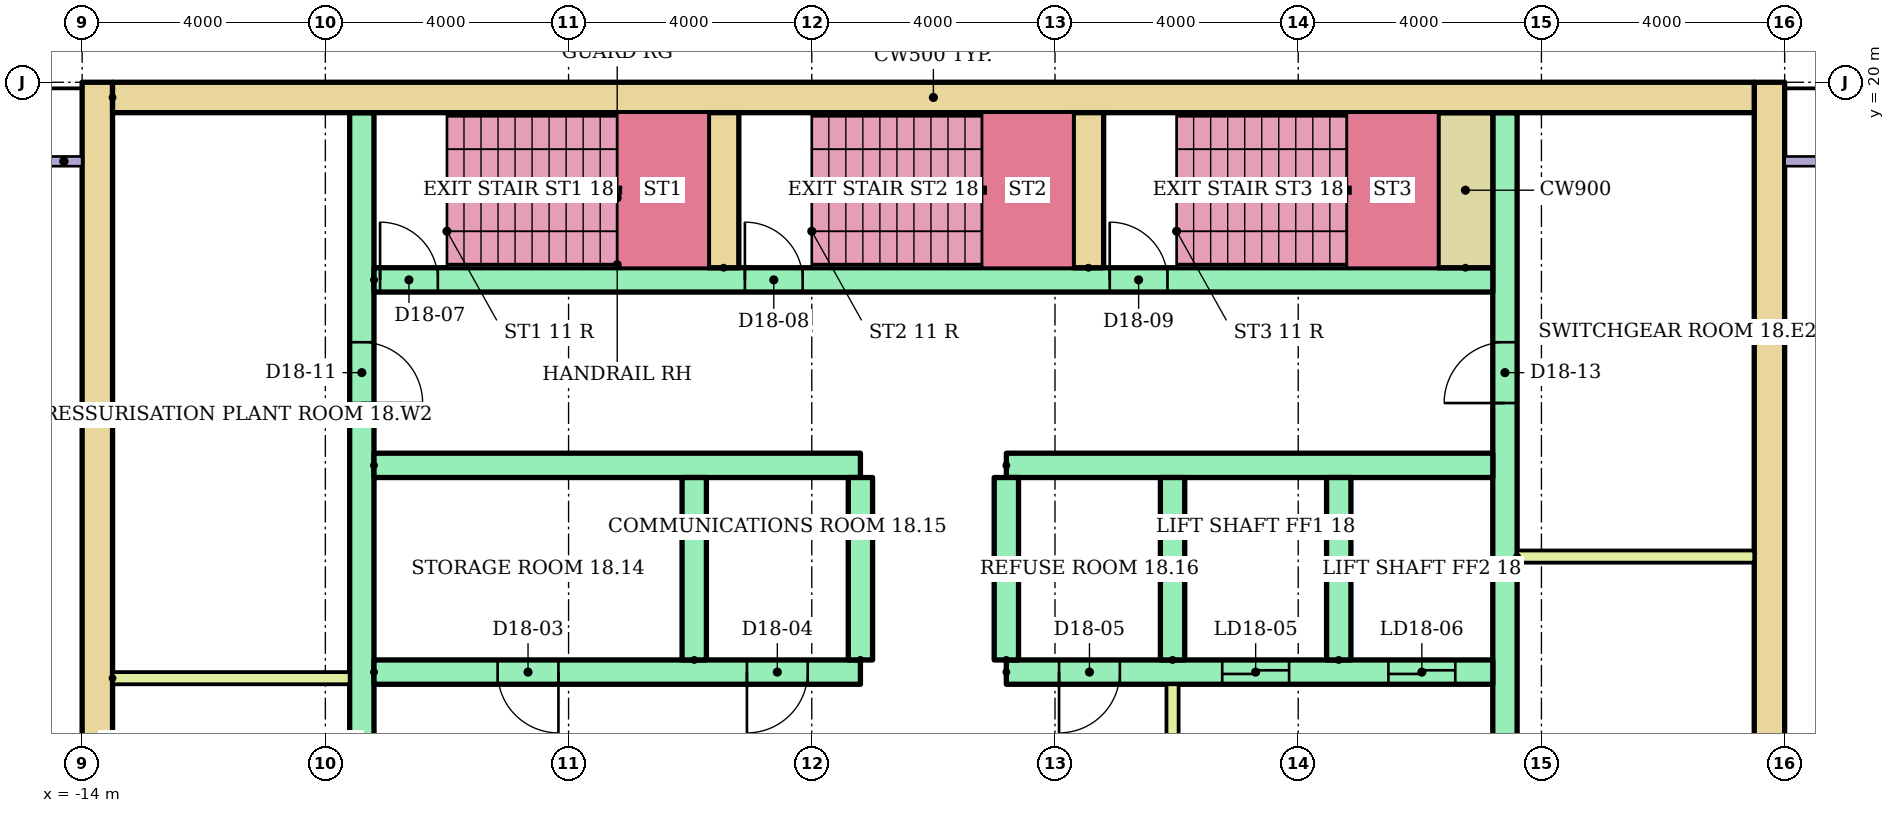
"""IFC4 building model, lengths in metres.
Left out: names, types, materials, properties, quantities, classifications, styles, units other than length and angle.
Written with IfcOpenShell. Run it as: python <this file> out.ifc"""

import sys

from ifc_helpers import new_model, si_unit, direction, frame, frame_2d, origin, place, context, subcontext, project, spatial, rectangle, extrude, element, fill, save


model = new_model("IFC4")
c1 = context("Model", 3, precision=1e-05, world=origin(), true_north=direction((0.0, 1.0)))
c2 = subcontext(c1, "Body", "Model", "MODEL_VIEW")
j1 = project(units=[si_unit("LENGTHUNIT", "METRE"), si_unit("PLANEANGLEUNIT", "RADIAN")], contexts=[c1])
p1 = place(None, origin())
s1 = spatial("IfcSite", under=j1, at=p1, CompositionType="ELEMENT")
p2 = place(p1, origin())
s2 = spatial("IfcBuilding", under=s1, at=p2, CompositionType="ELEMENT")
p3 = place(p2, frame((0.0, 0.0, 73.6)))
s3 = spatial("IfcBuildingStorey", under=s2, at=p3, CompositionType="ELEMENT", Elevation=73.6)
for number, where, z_axis, x_axis in (
    (1, (-13.75, 3.0, 0.0), (0.0, 0.0, 1.0), (0.0, 1.0, 0.0)),
    (2, (13.75, 3.0, 0.0), (0.0, 0.0, 1.0), (0.0, 1.0, 0.0)),
):
    element("IfcWall", number, at=place(p3, frame(where, z_axis=z_axis, x_axis=x_axis)), inside=s3, PredefinedType="SHEAR", context=c2, shape_type="SweptSolid", body=[
        extrude(rectangle(XDim=17.0, YDim=0.5, at=frame_2d((8.5, 0.0))), origin(), (0.0, 0.0, 1.0), 3.62),
    ])
p4 = place(p3, frame((-13.5, 19.75, 0.0)))
e3 = element("IfcWall", 3, at=p4, inside=s3, PredefinedType="SHEAR", context=c2, shape_type="SweptSolid", body=[
    extrude(rectangle(XDim=27.0, YDim=0.5, at=frame_2d((13.5, 0.0))), origin(), (0.0, 0.0, 1.0), 3.62),
])
p5 = place(p3, frame((-9.4, 6.8, 0.0), z_axis=(0.0, 0.0, 1.0), x_axis=(0.0, 1.0, 0.0)))
e4 = element("IfcWall", 4, at=p5, inside=s3, PredefinedType="SHEAR", context=c2, shape_type="SweptSolid", body=[
    extrude(rectangle(XDim=12.7, YDim=0.4, at=frame_2d((6.35, 0.0))), origin(), (0.0, 0.0, 1.0), 3.62),
])
p6 = place(p5, frame((1.15, 0.0, 0.0)))
e5 = element("IfcOpeningElement", 5, at=p6, cuts=e4, PredefinedType="OPENING", context=c2, shape_type="SweptSolid", body=[
    extrude(rectangle(XDim=1.0, YDim=2.1, at=frame_2d((0.5, 1.05))), frame((0.0, 0.21, 0.0), z_axis=(0.0, -1.0, 0.0), x_axis=(1.0, 0.0, 0.0)), (0.0, 0.0, 1.0), 0.42),
])
p7 = place(p5, frame((7.925, 0.0, 0.0)))
e6 = element("IfcOpeningElement", 6, at=p7, cuts=e4, PredefinedType="OPENING", context=c2, shape_type="SweptSolid", body=[
    extrude(rectangle(XDim=1.0, YDim=2.1, at=frame_2d((0.5, 1.05))), frame((0.0, 0.21, 0.0), z_axis=(0.0, -1.0, 0.0), x_axis=(1.0, 0.0, 0.0)), (0.0, 0.0, 1.0), 0.42),
])
p8 = place(p3, frame((9.4, 6.8, 0.0), z_axis=(0.0, 0.0, 1.0), x_axis=(0.0, 1.0, 0.0)))
e7 = element("IfcWall", 7, at=p8, inside=s3, PredefinedType="SHEAR", context=c2, shape_type="SweptSolid", body=[
    extrude(rectangle(XDim=12.7, YDim=0.4, at=frame_2d((6.35, 0.0))), origin(), (0.0, 0.0, 1.0), 3.62),
])
p9 = place(p8, frame((1.15, 0.0, 0.0)))
e8 = element("IfcOpeningElement", 8, at=p9, cuts=e7, PredefinedType="OPENING", context=c2, shape_type="SweptSolid", body=[
    extrude(rectangle(XDim=1.0, YDim=2.1, at=frame_2d((0.5, 1.05))), frame((0.0, 0.21, 0.0), z_axis=(0.0, -1.0, 0.0), x_axis=(1.0, 0.0, 0.0)), (0.0, 0.0, 1.0), 0.42),
])
p10 = place(p8, frame((7.925, 0.0, 0.0)))
e9 = element("IfcOpeningElement", 9, at=p10, cuts=e7, PredefinedType="OPENING", context=c2, shape_type="SweptSolid", body=[
    extrude(rectangle(XDim=1.0, YDim=2.1, at=frame_2d((0.5, 1.05))), frame((0.0, 0.21, 0.0), z_axis=(0.0, -1.0, 0.0), x_axis=(1.0, 0.0, 0.0)), (0.0, 0.0, 1.0), 0.42),
])
p11 = place(p3, frame((-9.2, 10.3, 0.0)))
e10 = element("IfcWall", 10, at=p11, inside=s3, PredefinedType="SHEAR", context=c2, shape_type="SweptSolid", body=[
    extrude(rectangle(XDim=8.0, YDim=0.4, at=frame_2d((4.0, 0.0))), origin(), (0.0, 0.0, 1.0), 3.62),
])
p12 = place(p11, frame((2.033, 0.0, 0.0)))
e11 = element("IfcOpeningElement", 11, at=p12, cuts=e10, PredefinedType="OPENING", context=c2, shape_type="SweptSolid", body=[
    extrude(rectangle(XDim=1.0, YDim=2.1, at=frame_2d((0.5, 1.05))), frame((0.0, 0.21, 0.0), z_axis=(0.0, -1.0, 0.0), x_axis=(1.0, 0.0, 0.0)), (0.0, 0.0, 1.0), 0.42),
])
p13 = place(p11, frame((6.133, 0.0, 0.0)))
e12 = element("IfcOpeningElement", 12, at=p13, cuts=e10, PredefinedType="OPENING", context=c2, shape_type="SweptSolid", body=[
    extrude(rectangle(XDim=1.0, YDim=2.1, at=frame_2d((0.5, 1.05))), frame((0.0, 0.21, 0.0), z_axis=(0.0, -1.0, 0.0), x_axis=(1.0, 0.0, 0.0)), (0.0, 0.0, 1.0), 0.42),
])
p14 = place(p3, frame((-9.2, 13.7, 0.0)))
e13 = element("IfcWall", 13, at=p14, inside=s3, PredefinedType="SHEAR", context=c2, shape_type="SweptSolid", body=[
    extrude(rectangle(XDim=8.0, YDim=0.4, at=frame_2d((4.0, 0.0))), origin(), (0.0, 0.0, 1.0), 3.62),
])
p15 = place(p3, frame((1.2, 10.3, 0.0)))
e14 = element("IfcWall", 14, at=p15, inside=s3, PredefinedType="SHEAR", context=c2, shape_type="SweptSolid", body=[
    extrude(rectangle(XDim=8.0, YDim=0.4, at=frame_2d((4.0, 0.0))), origin(), (0.0, 0.0, 1.0), 3.62),
])
p16 = place(p15, frame((3.55, 0.0, 0.0)))
e15 = element("IfcOpeningElement", 15, at=p16, cuts=e14, PredefinedType="OPENING", context=c2, shape_type="SweptSolid", body=[
    extrude(rectangle(XDim=1.1, YDim=2.1, at=frame_2d((0.55, 1.05))), frame((0.0, 0.21, 0.0), z_axis=(0.0, -1.0, 0.0), x_axis=(1.0, 0.0, 0.0)), (0.0, 0.0, 1.0), 0.42),
])
p17 = place(p15, frame((6.283, 0.0, 0.0)))
e16 = element("IfcOpeningElement", 16, at=p17, cuts=e14, PredefinedType="OPENING", context=c2, shape_type="SweptSolid", body=[
    extrude(rectangle(XDim=1.1, YDim=2.1, at=frame_2d((0.55, 1.05))), frame((0.0, 0.21, 0.0), z_axis=(0.0, -1.0, 0.0), x_axis=(1.0, 0.0, 0.0)), (0.0, 0.0, 1.0), 0.42),
])
p18 = place(p15, frame((0.867, 0.0, 0.0)))
e17 = element("IfcOpeningElement", 17, at=p18, cuts=e14, PredefinedType="OPENING", context=c2, shape_type="SweptSolid", body=[
    extrude(rectangle(XDim=1.0, YDim=2.1, at=frame_2d((0.5, 1.05))), frame((0.0, 0.21, 0.0), z_axis=(0.0, -1.0, 0.0), x_axis=(1.0, 0.0, 0.0)), (0.0, 0.0, 1.0), 0.42),
])
p19 = place(p3, frame((1.2, 13.7, 0.0)))
e18 = element("IfcWall", 18, at=p19, inside=s3, PredefinedType="SHEAR", context=c2, shape_type="SweptSolid", body=[
    extrude(rectangle(XDim=8.0, YDim=0.4, at=frame_2d((4.0, 0.0))), origin(), (0.0, 0.0, 1.0), 3.62),
])
for number, where, z_axis, x_axis in (
    (19, (-3.933, 10.5, 0.0), (0.0, 0.0, 1.0), (0.0, 1.0, 0.0)),
    (20, (-1.2, 10.5, 0.0), (0.0, 0.0, 1.0), (0.0, 1.0, 0.0)),
    (21, (1.2, 10.5, 0.0), (0.0, 0.0, 1.0), (0.0, 1.0, 0.0)),
    (22, (3.933, 10.5, 0.0), (0.0, 0.0, 1.0), (0.0, 1.0, 0.0)),
    (23, (6.667, 10.5, 0.0), (0.0, 0.0, 1.0), (0.0, 1.0, 0.0)),
):
    element("IfcWall", number, at=place(p3, frame(where, z_axis=z_axis, x_axis=x_axis)), inside=s3, PredefinedType="SHEAR", context=c2, shape_type="SweptSolid", body=[
        extrude(rectangle(XDim=3.0, YDim=0.4, at=frame_2d((1.5, 0.0))), origin(), (0.0, 0.0, 1.0), 3.62),
    ])
p20 = place(p3, frame((3.933, 6.8, 0.0), z_axis=(0.0, 0.0, 1.0), x_axis=(0.0, 1.0, 0.0)))
e24 = element("IfcWall", 24, at=p20, inside=s3, PredefinedType="PARTITIONING", context=c2, shape_type="SweptSolid", body=[
    extrude(rectangle(XDim=3.3, YDim=0.2, at=frame_2d((1.65, 0.0))), origin(), (0.0, 0.0, 1.0), 3.62),
])
p21 = place(p20, frame((1.1, 0.0, 0.0)))
e25 = element("IfcOpeningElement", 25, at=p21, cuts=e24, PredefinedType="OPENING", context=c2, shape_type="SweptSolid", body=[
    extrude(rectangle(XDim=1.1, YDim=2.1, at=frame_2d((0.55, 1.05))), frame((0.0, 0.11, 0.0), z_axis=(0.0, -1.0, 0.0), x_axis=(1.0, 0.0, 0.0)), (0.0, 0.0, 1.0), 0.22),
])
p22 = place(p3, frame((-9.2, 16.75, 0.0)))
e26 = element("IfcWall", 26, at=p22, inside=s3, PredefinedType="SHEAR", context=c2, shape_type="SweptSolid", body=[
    extrude(rectangle(XDim=18.4, YDim=0.4, at=frame_2d((9.2, 0.0))), origin(), (0.0, 0.0, 1.0), 3.62),
])
p23 = place(p22, frame((0.1, 0.0, 0.0)))
e27 = element("IfcOpeningElement", 27, at=p23, cuts=e26, PredefinedType="OPENING", context=c2, shape_type="SweptSolid", body=[
    extrude(rectangle(XDim=0.95, YDim=2.1, at=frame_2d((0.475, 1.05))), frame((0.0, 0.21, 0.0), z_axis=(0.0, -1.0, 0.0), x_axis=(1.0, 0.0, 0.0)), (0.0, 0.0, 1.0), 0.42),
])
p24 = place(p22, frame((6.1, 0.0, 0.0)))
e28 = element("IfcOpeningElement", 28, at=p24, cuts=e26, PredefinedType="OPENING", context=c2, shape_type="SweptSolid", body=[
    extrude(rectangle(XDim=0.95, YDim=2.1, at=frame_2d((0.475, 1.05))), frame((0.0, 0.21, 0.0), z_axis=(0.0, -1.0, 0.0), x_axis=(1.0, 0.0, 0.0)), (0.0, 0.0, 1.0), 0.42),
])
p25 = place(p22, frame((12.1, 0.0, 0.0)))
e29 = element("IfcOpeningElement", 29, at=p25, cuts=e26, PredefinedType="OPENING", context=c2, shape_type="SweptSolid", body=[
    extrude(rectangle(XDim=0.95, YDim=2.1, at=frame_2d((0.475, 1.05))), frame((0.0, 0.21, 0.0), z_axis=(0.0, -1.0, 0.0), x_axis=(1.0, 0.0, 0.0)), (0.0, 0.0, 1.0), 0.42),
])
for number, where, z_axis, x_axis in (
    (30, (-3.45, 16.95, 0.0), (0.0, 0.0, 1.0), (0.0, 1.0, 0.0)),
    (31, (2.55, 16.95, 0.0), (0.0, 0.0, 1.0), (0.0, 1.0, 0.0)),
):
    element("IfcWall", number, at=place(p3, frame(where, z_axis=z_axis, x_axis=x_axis)), inside=s3, PredefinedType="SHEAR", context=c2, shape_type="SweptSolid", body=[
        extrude(rectangle(XDim=2.55, YDim=0.5, at=frame_2d((1.275, 0.0))), origin(), (0.0, 0.0, 1.0), 3.62),
    ])
p26 = place(p3, frame((8.75, 16.95, 0.0), z_axis=(0.0, 0.0, 1.0), x_axis=(0.0, 1.0, 0.0)))
e32 = element("IfcWall", 32, at=p26, inside=s3, PredefinedType="SHEAR", context=c2, shape_type="SweptSolid", body=[
    extrude(rectangle(XDim=2.55, YDim=0.9, at=frame_2d((1.275, 0.0))), origin(), (0.0, 0.0, 1.0), 3.62),
])
for number, where in (
    (33, (-13.5, 10.2, 0.0)),
    (34, (9.6, 12.2, 0.0)),
):
    element("IfcWall", number, at=place(p3, frame(where)), inside=s3, PredefinedType="PARTITIONING", context=c2, shape_type="SweptSolid", body=[
        extrude(rectangle(XDim=3.9, YDim=0.2, at=frame_2d((1.95, 0.0))), origin(), (0.0, 0.0, 1.0), 3.62),
    ])
p27 = place(p16, origin())
e35 = element("IfcDoor", 35, at=p27, inside=s3, OperationType="SLIDING_TO_LEFT", PredefinedType="DOOR", context=c2, shape_type="SweptSolid", body=[
    extrude(rectangle(XDim=1.1, YDim=2.1, at=frame_2d((0.55, 1.05))), frame((0.0, 0.025, 0.0), z_axis=(0.0, -1.0, 0.0), x_axis=(1.0, 0.0, 0.0)), (0.0, 0.0, 1.0), 0.05),
])
fill(e15, e35)
p28 = place(p17, origin())
e36 = element("IfcDoor", 36, at=p28, inside=s3, OperationType="SLIDING_TO_LEFT", PredefinedType="DOOR", context=c2, shape_type="SweptSolid", body=[
    extrude(rectangle(XDim=1.1, YDim=2.1, at=frame_2d((0.55, 1.05))), frame((0.0, 0.025, 0.0), z_axis=(0.0, -1.0, 0.0), x_axis=(1.0, 0.0, 0.0)), (0.0, 0.0, 1.0), 0.05),
])
fill(e16, e36)
p29 = place(p12, frame((1.0, 0.0, 0.0), z_axis=(0.0, 0.0, 1.0), x_axis=(-1.0, 0.0, 0.0)))
e37 = element("IfcDoor", 37, at=p29, inside=s3, OperationType="SINGLE_SWING_RIGHT", PredefinedType="DOOR", context=c2, shape_type="SweptSolid", body=[
    extrude(rectangle(XDim=1.0, YDim=2.1, at=frame_2d((0.5, 1.05))), frame((0.0, 0.025, 0.0), z_axis=(0.0, -1.0, 0.0), x_axis=(1.0, 0.0, 0.0)), (0.0, 0.0, 1.0), 0.05),
])
fill(e11, e37)
p30 = place(p13, frame((1.0, 0.0, 0.0), z_axis=(0.0, 0.0, 1.0), x_axis=(-1.0, 0.0, 0.0)))
e38 = element("IfcDoor", 38, at=p30, inside=s3, OperationType="SINGLE_SWING_LEFT", PredefinedType="DOOR", context=c2, shape_type="SweptSolid", body=[
    extrude(rectangle(XDim=1.0, YDim=2.1, at=frame_2d((0.5, 1.05))), frame((0.0, 0.025, 0.0), z_axis=(0.0, -1.0, 0.0), x_axis=(1.0, 0.0, 0.0)), (0.0, 0.0, 1.0), 0.05),
])
fill(e12, e38)
p31 = place(p18, frame((1.0, 0.0, 0.0), z_axis=(0.0, 0.0, 1.0), x_axis=(-1.0, 0.0, 0.0)))
e39 = element("IfcDoor", 39, at=p31, inside=s3, OperationType="SINGLE_SWING_LEFT", PredefinedType="DOOR", context=c2, shape_type="SweptSolid", body=[
    extrude(rectangle(XDim=1.0, YDim=2.1, at=frame_2d((0.5, 1.05))), frame((0.0, 0.025, 0.0), z_axis=(0.0, -1.0, 0.0), x_axis=(1.0, 0.0, 0.0)), (0.0, 0.0, 1.0), 0.05),
])
fill(e17, e39)
p32 = place(p23, origin())
e40 = element("IfcDoor", 40, at=p32, inside=s3, OperationType="SINGLE_SWING_LEFT", PredefinedType="DOOR", context=c2, shape_type="SweptSolid", body=[
    extrude(rectangle(XDim=0.95, YDim=2.1, at=frame_2d((0.475, 1.05))), frame((0.0, 0.025, 0.0), z_axis=(0.0, -1.0, 0.0), x_axis=(1.0, 0.0, 0.0)), (0.0, 0.0, 1.0), 0.05),
])
fill(e27, e40)
p33 = place(p24, origin())
e41 = element("IfcDoor", 41, at=p33, inside=s3, OperationType="SINGLE_SWING_LEFT", PredefinedType="DOOR", context=c2, shape_type="SweptSolid", body=[
    extrude(rectangle(XDim=0.95, YDim=2.1, at=frame_2d((0.475, 1.05))), frame((0.0, 0.025, 0.0), z_axis=(0.0, -1.0, 0.0), x_axis=(1.0, 0.0, 0.0)), (0.0, 0.0, 1.0), 0.05),
])
fill(e28, e41)
p34 = place(p25, origin())
e42 = element("IfcDoor", 42, at=p34, inside=s3, OperationType="SINGLE_SWING_LEFT", PredefinedType="DOOR", context=c2, shape_type="SweptSolid", body=[
    extrude(rectangle(XDim=0.95, YDim=2.1, at=frame_2d((0.475, 1.05))), frame((0.0, 0.025, 0.0), z_axis=(0.0, -1.0, 0.0), x_axis=(1.0, 0.0, 0.0)), (0.0, 0.0, 1.0), 0.05),
])
fill(e29, e42)
p35 = place(p7, frame((1.0, 0.0, 0.0), z_axis=(0.0, 0.0, 1.0), x_axis=(-1.0, 0.0, 0.0)))
e43 = element("IfcDoor", 43, at=p35, inside=s3, OperationType="SINGLE_SWING_LEFT", PredefinedType="DOOR", context=c2, shape_type="SweptSolid", body=[
    extrude(rectangle(XDim=1.0, YDim=2.1, at=frame_2d((0.5, 1.05))), frame((0.0, 0.025, 0.0), z_axis=(0.0, -1.0, 0.0), x_axis=(1.0, 0.0, 0.0)), (0.0, 0.0, 1.0), 0.05),
])
fill(e6, e43)
p36 = place(p10, origin())
e44 = element("IfcDoor", 44, at=p36, inside=s3, OperationType="SINGLE_SWING_LEFT", PredefinedType="DOOR", context=c2, shape_type="SweptSolid", body=[
    extrude(rectangle(XDim=1.0, YDim=2.1, at=frame_2d((0.5, 1.05))), frame((0.0, 0.025, 0.0), z_axis=(0.0, -1.0, 0.0), x_axis=(1.0, 0.0, 0.0)), (0.0, 0.0, 1.0), 0.05),
])
fill(e9, e44)
save(model, sys.argv[1])
